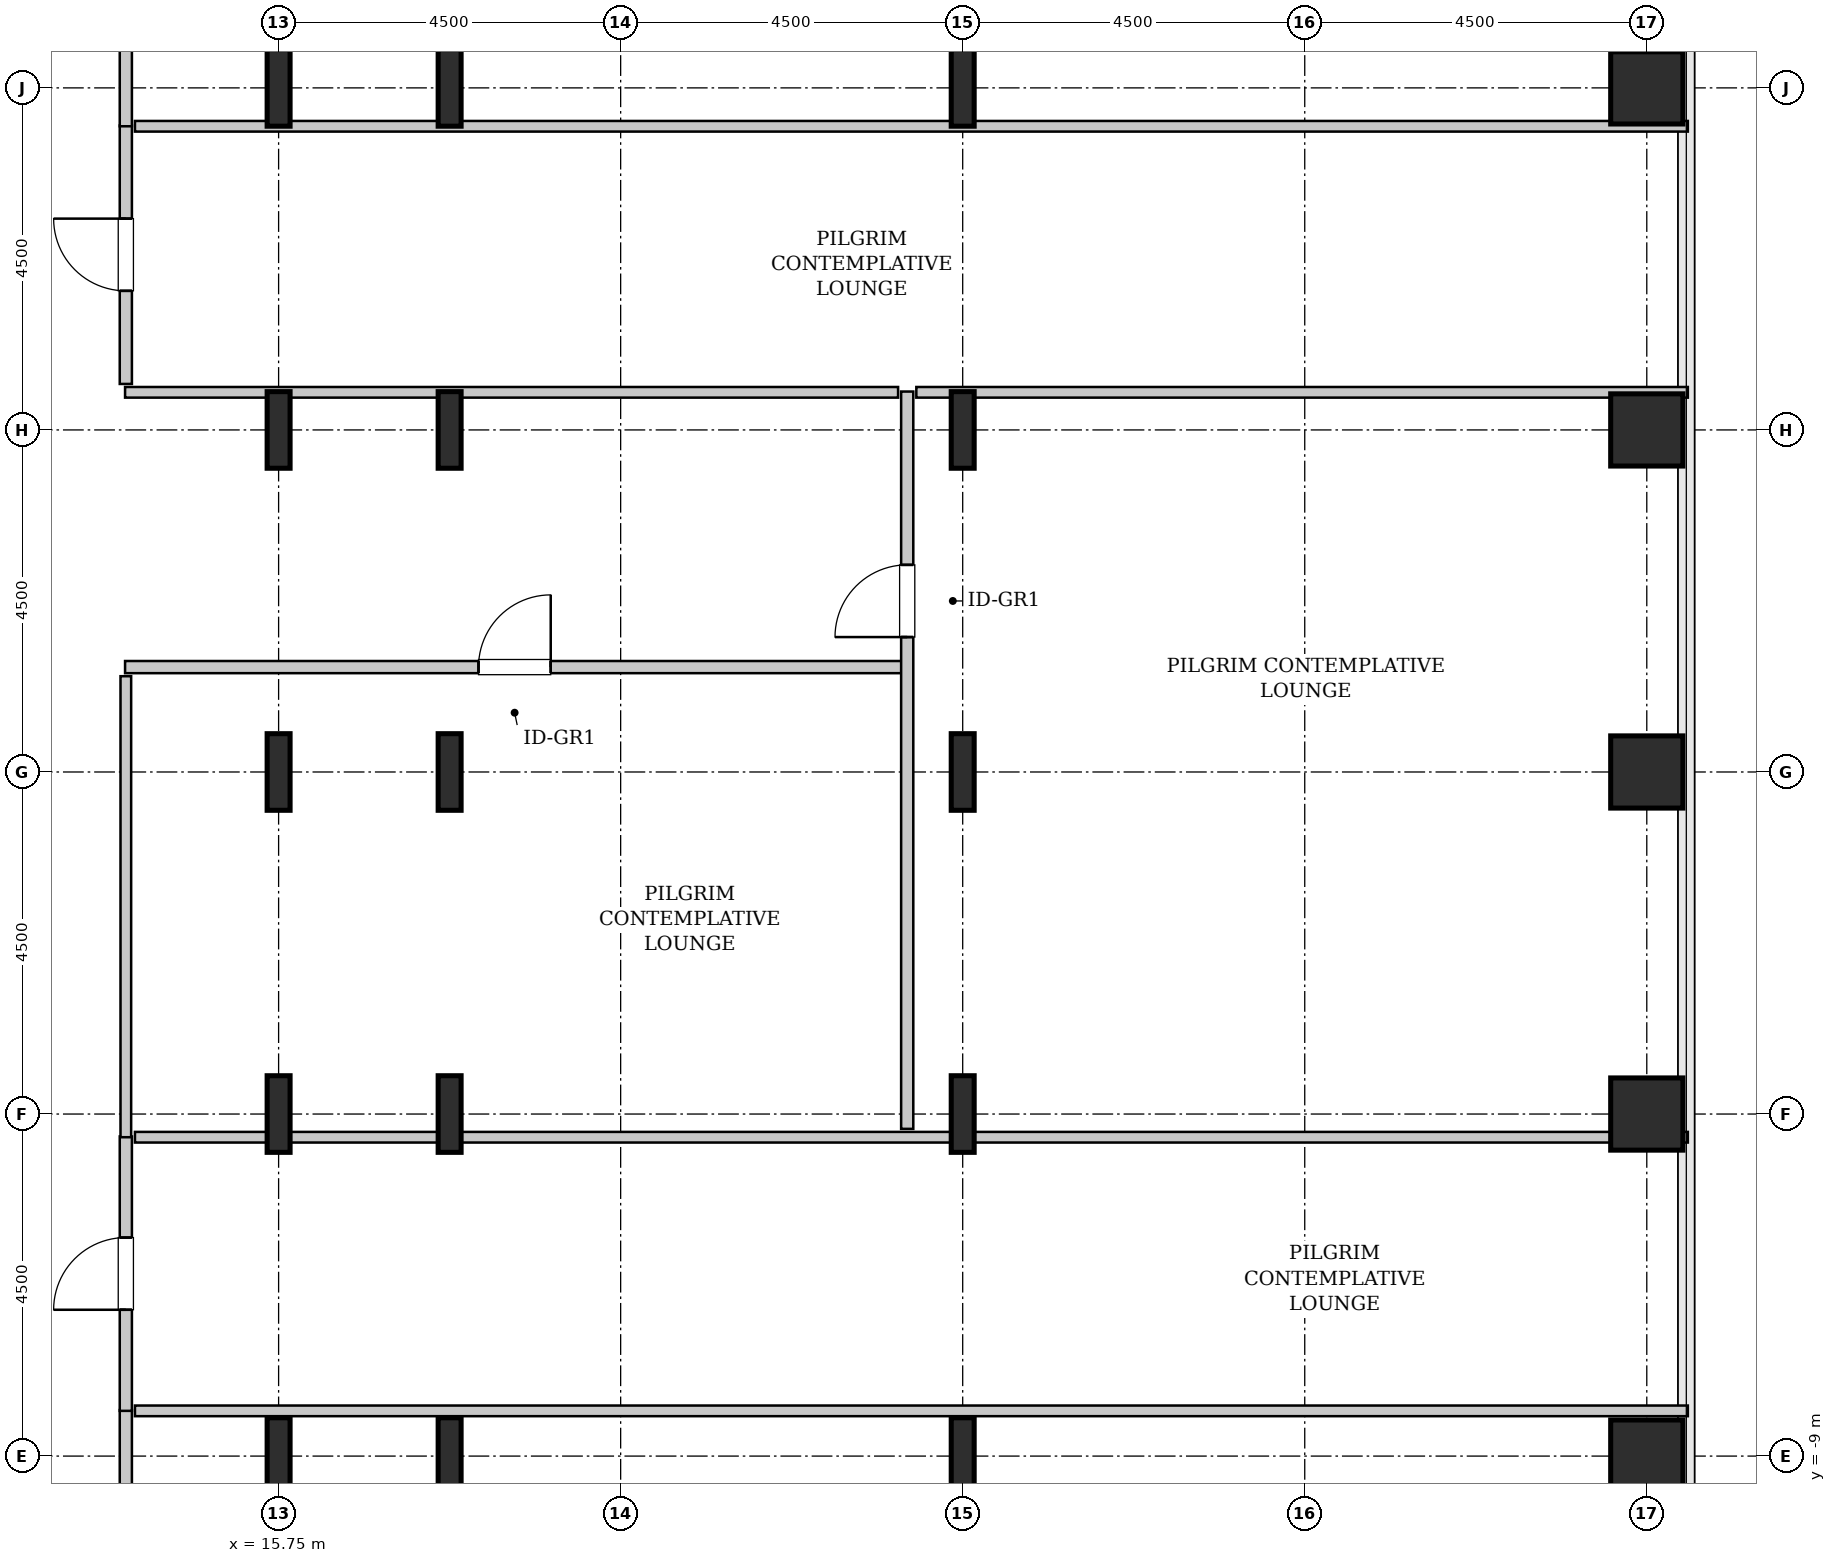
"""IFC4 building model, lengths in metres.
Left out: names, types, materials, properties, quantities, classifications, styles, units other than length and angle.
Written with IfcOpenShell. Run it as: python <this file> out.ifc"""

import sys

from ifc_helpers import new_model, si_unit, direction, frame, frame_2d, origin, origin_2d, place, context, subcontext, project, spatial, rectangle, hollow_rectangle, i_section, extrude, source, transform, mapped, element, fill, save


model = new_model("IFC4")
c1 = context("Model", 3, precision=1e-05, world=origin(), true_north=direction((0.0, 1.0)))
c2 = subcontext(c1, "Body", "Model", "MODEL_VIEW")
j1 = project(units=[si_unit("LENGTHUNIT", "METRE"), si_unit("PLANEANGLEUNIT", "RADIAN")], contexts=[c1])
p1 = place(None, origin())
s1 = spatial("IfcSite", under=j1, at=p1, CompositionType="ELEMENT")
p2 = place(p1, origin())
s2 = spatial("IfcBuilding", under=s1, at=p2, CompositionType="ELEMENT")
p3 = place(p2, frame((0.0, 0.0, 36.8)))
s3 = spatial("IfcBuildingStorey", under=s2, at=p3, CompositionType="ELEMENT", Elevation=36.8)
m1 = source(origin(), c2, "Body", "SweptSolid", [
    extrude(i_section(OverallWidth=0.302, OverallDepth=1.008, WebThickness=0.021, FlangeThickness=0.04, FilletRadius=0.03, at=origin_2d()), origin(), (0.0, 0.0, 1.0), 3.8),
])
for number, where, z_axis, x_axis in (
    (1, (15.75, -9.0, 0.0), (0.0, 0.0, 1.0), (1.0, 0.0, 0.0)),
    (2, (15.75, -4.5, 0.0), (0.0, 0.0, 1.0), (1.0, 0.0, 0.0)),
    (3, (15.75, 0.0, 0.0), (0.0, 0.0, 1.0), (1.0, 0.0, 0.0)),
    (4, (15.75, 4.5, 0.0), (0.0, 0.0, 1.0), (1.0, 0.0, 0.0)),
    (5, (15.75, 9.0, 0.0), (0.0, 0.0, 1.0), (1.0, 0.0, 0.0)),
    (6, (18.0, -9.0, 0.0), (0.0, 0.0, 1.0), (1.0, 0.0, 0.0)),
    (7, (18.0, -4.5, 0.0), (0.0, 0.0, 1.0), (1.0, 0.0, 0.0)),
    (8, (18.0, 0.0, 0.0), (0.0, 0.0, 1.0), (1.0, 0.0, 0.0)),
    (9, (18.0, 4.5, 0.0), (0.0, 0.0, 1.0), (1.0, 0.0, 0.0)),
    (10, (18.0, 9.0, 0.0), (0.0, 0.0, 1.0), (1.0, 0.0, 0.0)),
    (11, (24.75, -9.0, 0.0), (0.0, 0.0, 1.0), (1.0, 0.0, 0.0)),
    (12, (24.75, -4.5, 0.0), (0.0, 0.0, 1.0), (1.0, 0.0, 0.0)),
    (13, (24.75, 0.0, 0.0), (0.0, 0.0, 1.0), (1.0, 0.0, 0.0)),
    (14, (24.75, 4.5, 0.0), (0.0, 0.0, 1.0), (1.0, 0.0, 0.0)),
    (15, (24.75, 9.0, 0.0), (0.0, 0.0, 1.0), (1.0, 0.0, 0.0)),
):
    element("IfcColumn", number, at=place(p3, frame(where, z_axis=z_axis, x_axis=x_axis)), inside=s3, PredefinedType="COLUMN", context=c2, shape_type="MappedRepresentation", body=[
        mapped(m1, transform((0.0, 0.0, 0.0), x_axis=(1.0, 0.0, 0.0), y_axis=(0.0, 1.0, 0.0), z_axis=(0.0, 0.0, 1.0), scale=1.0)),
    ])
m2 = source(origin(), c2, "Body", "SweptSolid", [
    extrude(hollow_rectangle(XDim=0.95, YDim=0.95, WallThickness=0.045, InnerFilletRadius=0.045, OuterFilletRadius=0.09, at=origin_2d()), origin(), (0.0, 0.0, 1.0), 3.8),
])
for number, where, z_axis, x_axis in (
    (16, (33.75, -9.0, 0.0), (0.0, 0.0, 1.0), (1.0, 0.0, 0.0)),
    (17, (33.75, -4.5, 0.0), (0.0, 0.0, 1.0), (1.0, 0.0, 0.0)),
    (18, (33.75, 0.0, 0.0), (0.0, 0.0, 1.0), (1.0, 0.0, 0.0)),
    (19, (33.75, 4.5, 0.0), (0.0, 0.0, 1.0), (1.0, 0.0, 0.0)),
    (20, (33.75, 9.0, 0.0), (0.0, 0.0, 1.0), (1.0, 0.0, 0.0)),
):
    element("IfcColumn", number, at=place(p3, frame(where, z_axis=z_axis, x_axis=x_axis)), inside=s3, PredefinedType="COLUMN", context=c2, shape_type="MappedRepresentation", body=[
        mapped(m2, transform((0.0, 0.0, 0.0), x_axis=(1.0, 0.0, 0.0), y_axis=(0.0, 1.0, 0.0), z_axis=(0.0, 0.0, 1.0), scale=1.0)),
    ])
m3 = source(origin(), c2, "Body", "SweptSolid", [
    extrude(rectangle(XDim=14.645, YDim=0.16, at=frame_2d((7.323, 0.0))), origin(), (0.0, 0.0, 1.0), 3.535),
])
p4 = place(p3, frame((13.74, -23.04, 0.0), z_axis=(0.0, 0.0, 1.0), x_axis=(0.0, 1.0, 0.0)))
e21 = element("IfcWall", 21, at=p4, inside=s3, PredefinedType="PARTITIONING", context=c2, shape_type="MappedRepresentation", body=[
    mapped(m3, transform((0.0, 0.0, 0.0), x_axis=(1.0, 0.0, 0.0), y_axis=(0.0, 1.0, 0.0), z_axis=(0.0, 0.0, 1.0), scale=1.0)),
])
p5 = place(p4, frame((12.613, 0.0, 0.0)))
e22 = element("IfcOpeningElement", 22, at=p5, cuts=e21, PredefinedType="OPENING", context=c2, shape_type="SweptSolid", body=[
    extrude(rectangle(XDim=0.95, YDim=2.1, at=frame_2d((0.475, 1.05))), frame((0.0, 0.09, 0.0), z_axis=(0.0, -1.0, 0.0), x_axis=(1.0, 0.0, 0.0)), (0.0, 0.0, 1.0), 0.18),
])
m4 = source(origin(), c2, "Body", "SweptSolid", [
    extrude(rectangle(XDim=20.43, YDim=0.14, at=frame_2d((10.215, 0.0))), origin(), (0.0, 0.0, 1.0), 3.535),
])
p6 = place(p3, frame((13.86, -8.405, 0.0), z_axis=(0.0, 0.0, 1.0), x_axis=(1.0, 0.0, 0.0)))
e23 = element("IfcWall", 23, at=p6, inside=s3, PredefinedType="PARTITIONING", context=c2, shape_type="MappedRepresentation", body=[
    mapped(m4, transform((0.0, 0.0, 0.0), x_axis=(1.0, 0.0, 0.0), y_axis=(0.0, 1.0, 0.0), z_axis=(0.0, 0.0, 1.0), scale=1.0)),
])
m5 = source(origin(), c2, "Body", "SweptSolid", [
    extrude(rectangle(XDim=3.61, YDim=0.16, at=frame_2d((1.805, 0.0))), origin(), (0.0, 0.0, 1.0), 3.535),
])
p7 = place(p3, frame((13.74, -8.405, 0.0), z_axis=(0.0, 0.0, 1.0), x_axis=(0.0, 1.0, 0.0)))
e24 = element("IfcWall", 24, at=p7, inside=s3, PredefinedType="PARTITIONING", context=c2, shape_type="MappedRepresentation", body=[
    mapped(m5, transform((0.0, 0.0, 0.0), x_axis=(1.0, 0.0, 0.0), y_axis=(0.0, 1.0, 0.0), z_axis=(0.0, 0.0, 1.0), scale=1.0)),
])
p8 = place(p7, frame((1.33, 0.0, 0.0)))
e25 = element("IfcOpeningElement", 25, at=p8, cuts=e24, PredefinedType="OPENING", context=c2, shape_type="SweptSolid", body=[
    extrude(rectangle(XDim=0.95, YDim=2.1, at=frame_2d((0.475, 1.05))), frame((0.0, 0.09, 0.0), z_axis=(0.0, -1.0, 0.0), x_axis=(1.0, 0.0, 0.0)), (0.0, 0.0, 1.0), 0.18),
])
m6 = source(origin(), c2, "Body", "SweptSolid", [
    extrude(rectangle(XDim=20.43, YDim=0.14, at=frame_2d((10.215, 0.0))), origin(), (0.0, 0.0, 1.0), 2.825),
])
p9 = place(p3, frame((13.86, -4.805, 0.0), z_axis=(0.0, 0.0, 1.0), x_axis=(1.0, 0.0, 0.0)))
e26 = element("IfcWall", 26, at=p9, inside=s3, PredefinedType="PARTITIONING", context=c2, shape_type="MappedRepresentation", body=[
    mapped(m6, transform((0.0, 0.0, 0.0), x_axis=(1.0, 0.0, 0.0), y_axis=(0.0, 1.0, 0.0), z_axis=(0.0, 0.0, 1.0), scale=1.0)),
])
m7 = source(origin(), c2, "Body", "SweptSolid", [
    extrude(rectangle(XDim=10.25, YDim=0.16, at=frame_2d((5.125, 0.0))), origin(), (0.0, 0.0, 1.0), 3.535),
])
p10 = place(p3, frame((13.73, 1.38, 0.0), z_axis=(0.0, 0.0, 1.0), x_axis=(1.0, 0.0, 0.0)))
e27 = element("IfcWall", 27, at=p10, inside=s3, PredefinedType="PARTITIONING", context=c2, shape_type="MappedRepresentation", body=[
    mapped(m7, transform((0.0, 0.0, 0.0), x_axis=(1.0, 0.0, 0.0), y_axis=(0.0, 1.0, 0.0), z_axis=(0.0, 0.0, 1.0), scale=1.0)),
])
p11 = place(p10, frame((4.65, 0.0, 0.0)))
e28 = element("IfcOpeningElement", 28, at=p11, cuts=e27, PredefinedType="OPENING", context=c2, shape_type="SweptSolid", body=[
    extrude(rectangle(XDim=0.95, YDim=2.1, at=frame_2d((0.475, 1.05))), frame((0.0, 0.09, 0.0), z_axis=(0.0, -1.0, 0.0), x_axis=(1.0, 0.0, 0.0)), (0.0, 0.0, 1.0), 0.18),
])
m8 = source(origin(), c2, "Body", "SweptSolid", [
    extrude(rectangle(XDim=6.065, YDim=0.14, at=frame_2d((3.032, 0.0))), origin(), (0.0, 0.0, 1.0), 3.535),
])
p12 = place(p3, frame((13.74, -4.805, 0.0), z_axis=(0.0, 0.0, 1.0), x_axis=(0.0, 1.0, 0.0)))
e29 = element("IfcWall", 29, at=p12, inside=s3, PredefinedType="PARTITIONING", context=c2, shape_type="MappedRepresentation", body=[
    mapped(m8, transform((0.0, 0.0, 0.0), x_axis=(1.0, 0.0, 0.0), y_axis=(0.0, 1.0, 0.0), z_axis=(0.0, 0.0, 1.0), scale=1.0)),
])
m9 = source(origin(), c2, "Body", "SweptSolid", [
    extrude(rectangle(XDim=9.7, YDim=0.16, at=frame_2d((4.85, 0.0))), origin(), (0.0, 0.0, 1.0), 3.535),
])
p13 = place(p3, frame((24.02, -4.695, 0.0), z_axis=(0.0, 0.0, 1.0), x_axis=(0.0, 1.0, 0.0)))
e30 = element("IfcWall", 30, at=p13, inside=s3, PredefinedType="PARTITIONING", context=c2, shape_type="MappedRepresentation", body=[
    mapped(m9, transform((0.0, 0.0, 0.0), x_axis=(1.0, 0.0, 0.0), y_axis=(0.0, 1.0, 0.0), z_axis=(0.0, 0.0, 1.0), scale=1.0)),
])
p14 = place(p13, frame((6.47, 0.0, 0.0)))
e31 = element("IfcOpeningElement", 31, at=p14, cuts=e30, PredefinedType="OPENING", context=c2, shape_type="SweptSolid", body=[
    extrude(rectangle(XDim=0.95, YDim=2.1, at=frame_2d((0.475, 1.05))), frame((0.0, 0.09, 0.0), z_axis=(0.0, -1.0, 0.0), x_axis=(1.0, 0.0, 0.0)), (0.0, 0.0, 1.0), 0.18),
])
m10 = source(origin(), c2, "Body", "SweptSolid", [
    extrude(rectangle(XDim=10.17, YDim=0.14, at=frame_2d((5.085, 0.0))), origin(), (0.0, 0.0, 1.0), 2.825),
])
p15 = place(p3, frame((13.73, 4.995, 0.0), z_axis=(0.0, 0.0, 1.0), x_axis=(1.0, 0.0, 0.0)))
e32 = element("IfcWall", 32, at=p15, inside=s3, PredefinedType="PARTITIONING", context=c2, shape_type="MappedRepresentation", body=[
    mapped(m10, transform((0.0, 0.0, 0.0), x_axis=(1.0, 0.0, 0.0), y_axis=(0.0, 1.0, 0.0), z_axis=(0.0, 0.0, 1.0), scale=1.0)),
])
m11 = source(origin(), c2, "Body", "SweptSolid", [
    extrude(rectangle(XDim=10.15, YDim=0.14, at=frame_2d((5.075, 0.0))), origin(), (0.0, 0.0, 1.0), 2.825),
])
p16 = place(p3, frame((24.14, 4.995, 0.0), z_axis=(0.0, 0.0, 1.0), x_axis=(1.0, 0.0, 0.0)))
e33 = element("IfcWall", 33, at=p16, inside=s3, PredefinedType="PARTITIONING", context=c2, shape_type="MappedRepresentation", body=[
    mapped(m11, transform((0.0, 0.0, 0.0), x_axis=(1.0, 0.0, 0.0), y_axis=(0.0, 1.0, 0.0), z_axis=(0.0, 0.0, 1.0), scale=1.0)),
])
m12 = source(origin(), c2, "Body", "SweptSolid", [
    extrude(rectangle(XDim=3.4, YDim=0.16, at=frame_2d((1.7, 0.0))), origin(), (0.0, 0.0, 1.0), 3.535),
])
p17 = place(p3, frame((13.74, 5.105, 0.0), z_axis=(0.0, 0.0, 1.0), x_axis=(0.0, 1.0, 0.0)))
e34 = element("IfcWall", 34, at=p17, inside=s3, PredefinedType="PARTITIONING", context=c2, shape_type="MappedRepresentation", body=[
    mapped(m12, transform((0.0, 0.0, 0.0), x_axis=(1.0, 0.0, 0.0), y_axis=(0.0, 1.0, 0.0), z_axis=(0.0, 0.0, 1.0), scale=1.0)),
])
p18 = place(p17, frame((1.225, 0.0, 0.0)))
e35 = element("IfcOpeningElement", 35, at=p18, cuts=e34, PredefinedType="OPENING", context=c2, shape_type="SweptSolid", body=[
    extrude(rectangle(XDim=0.95, YDim=2.1, at=frame_2d((0.475, 1.05))), frame((0.0, 0.09, 0.0), z_axis=(0.0, -1.0, 0.0), x_axis=(1.0, 0.0, 0.0)), (0.0, 0.0, 1.0), 0.18),
])
p19 = place(p3, frame((13.86, 8.495, 0.0), z_axis=(0.0, 0.0, 1.0), x_axis=(1.0, 0.0, 0.0)))
e36 = element("IfcWall", 36, at=p19, inside=s3, PredefinedType="PARTITIONING", context=c2, shape_type="MappedRepresentation", body=[
    mapped(m6, transform((0.0, 0.0, 0.0), x_axis=(1.0, 0.0, 0.0), y_axis=(0.0, 1.0, 0.0), z_axis=(0.0, 0.0, 1.0), scale=1.0)),
])
m13 = source(origin(), c2, "Body", "SweptSolid", [
    extrude(rectangle(XDim=14.545, YDim=0.16, at=frame_2d((7.272, 0.0))), origin(), (0.0, 0.0, 1.0), 3.535),
])
p20 = place(p3, frame((13.74, 8.495, 0.0), z_axis=(0.0, 0.0, 1.0), x_axis=(0.0, 1.0, 0.0)))
e37 = element("IfcWall", 37, at=p20, inside=s3, PredefinedType="PARTITIONING", context=c2, shape_type="MappedRepresentation", body=[
    mapped(m13, transform((0.0, 0.0, 0.0), x_axis=(1.0, 0.0, 0.0), y_axis=(0.0, 1.0, 0.0), z_axis=(0.0, 0.0, 1.0), scale=1.0)),
])
p21 = place(p20, frame((1.032, 0.0, 0.0)))
e38 = element("IfcOpeningElement", 38, at=p21, cuts=e37, PredefinedType="OPENING", context=c2, shape_type="SweptSolid", body=[
    extrude(rectangle(XDim=0.95, YDim=2.1, at=frame_2d((0.475, 1.05))), frame((0.0, 0.09, 0.0), z_axis=(0.0, -1.0, 0.0), x_axis=(1.0, 0.0, 0.0)), (0.0, 0.0, 1.0), 0.18),
])
m14 = source(origin(), c2, "Body", "SweptSolid", [
    extrude(rectangle(XDim=0.95, YDim=2.1, at=frame_2d((0.475, 1.05))), frame((0.0, 0.025, 0.0), z_axis=(0.0, -1.0, 0.0), x_axis=(1.0, 0.0, 0.0)), (0.0, 0.0, 1.0), 0.05),
])
p22 = place(p8, origin())
e39 = element("IfcDoor", 39, at=p22, inside=s3, OperationType="SINGLE_SWING_LEFT", PredefinedType="DOOR", context=c2, shape_type="MappedRepresentation", body=[
    mapped(m14, transform((0.0, 0.0, 0.0), x_axis=(1.0, 0.0, 0.0), y_axis=(0.0, 1.0, 0.0), z_axis=(0.0, 0.0, 1.0), scale=1.0)),
])
fill(e25, e39)
p23 = place(p11, origin())
e40 = element("IfcDoor", 40, at=p23, inside=s3, OperationType="SINGLE_SWING_RIGHT", PredefinedType="DOOR", context=c2, shape_type="MappedRepresentation", body=[
    mapped(m14, transform((0.0, 0.0, 0.0), x_axis=(1.0, 0.0, 0.0), y_axis=(0.0, 1.0, 0.0), z_axis=(0.0, 0.0, 1.0), scale=1.0)),
])
fill(e28, e40)
p24 = place(p14, origin())
e41 = element("IfcDoor", 41, at=p24, inside=s3, OperationType="SINGLE_SWING_LEFT", PredefinedType="DOOR", context=c2, shape_type="MappedRepresentation", body=[
    mapped(m14, transform((0.0, 0.0, 0.0), x_axis=(1.0, 0.0, 0.0), y_axis=(0.0, 1.0, 0.0), z_axis=(0.0, 0.0, 1.0), scale=1.0)),
])
fill(e31, e41)
p25 = place(p18, origin())
e42 = element("IfcDoor", 42, at=p25, inside=s3, OperationType="SINGLE_SWING_RIGHT", PredefinedType="DOOR", context=c2, shape_type="MappedRepresentation", body=[
    mapped(m14, transform((0.0, 0.0, 0.0), x_axis=(1.0, 0.0, 0.0), y_axis=(0.0, 1.0, 0.0), z_axis=(0.0, 0.0, 1.0), scale=1.0)),
])
fill(e35, e42)
save(model, sys.argv[1])
